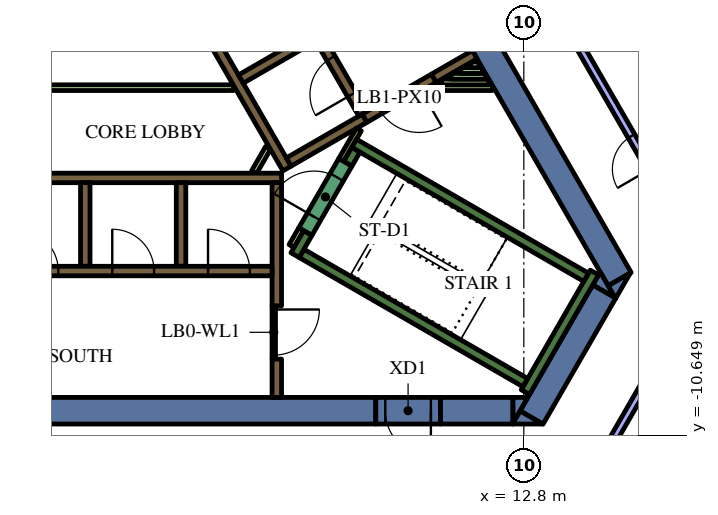
"""IFC4 building model, lengths in metres.
Left out: names, types, materials, properties, quantities, classifications, styles, units other than length and angle.
Written with IfcOpenShell. Run it as: python <this file> out.ifc"""

import sys

from ifc_helpers import new_model, si_unit, direction, frame, frame_2d, origin, place, context, subcontext, project, spatial, polyline, rectangle, outline, extrude, element, fill, save


model = new_model("IFC4")
c1 = context("Model", 3, precision=1e-05, world=origin(), true_north=direction((0.0, 1.0)))
c2 = subcontext(c1, "Body", "Model", "MODEL_VIEW")
j1 = project(units=[si_unit("LENGTHUNIT", "METRE"), si_unit("PLANEANGLEUNIT", "RADIAN")], contexts=[c1])
p1 = place(None, origin())
s1 = spatial("IfcSite", under=j1, at=p1, CompositionType="ELEMENT")
p2 = place(p1, origin())
s2 = spatial("IfcBuilding", under=s1, at=p2, CompositionType="ELEMENT")
p3 = place(p2, frame((0.0, 0.0, 243.6)))
s3 = spatial("IfcBuildingStorey", under=s2, at=p3, CompositionType="ELEMENT", Elevation=243.6)
p4 = place(p3, frame((9.085, 4.264, 0.0), z_axis=(0.0, 0.0, 1.0), x_axis=(0.499998082512, -0.866026510844, 0.0)))
e1 = element("IfcWall", 1, at=p4, inside=s3, PredefinedType="SOLIDWALL", context=c2, shape_type="SweptSolid", body=[
    extrude(rectangle(XDim=12.472, YDim=0.7, at=frame_2d((6.236, 0.0))), origin(), (0.0, 0.0, 1.0), 4.2),
])
p5 = place(p3, origin())
e2 = element("IfcWall", 2, at=p5, inside=s3, PredefinedType="SOLIDWALL", context=c2, shape_type="SweptSolid", body=[
    extrude(outline(polyline([(15.213, -7.05), (15.019, -6.714), (15.601, -6.378), (15.213, -7.05)])), origin(), (0.0, 0.0, 1.0), 4.2),
])
p6 = place(p3, frame((13.003, -10.179, 0.0), z_axis=(0.0, 0.0, 1.0), x_axis=(0.499972675833, 0.866041178825, 0.0)))
e3 = element("IfcWall", 3, at=p6, inside=s3, PredefinedType="SOLIDWALL", context=c2, shape_type="SweptSolid", body=[
    extrude(rectangle(XDim=3.829, YDim=0.7, at=frame_2d((1.915, 0.0))), origin(), (0.0, 0.0, 1.0), 4.2),
])
e4 = element("IfcWall", 4, at=p5, inside=s3, PredefinedType="SOLIDWALL", context=c2, shape_type="SweptSolid", body=[
    extrude(outline(polyline([(12.5, -10.35), (12.698, -10.005), (13.296, -10.35), (12.5, -10.35)])), origin(), (0.0, 0.0, 1.0), 4.2),
])
e5 = element("IfcWall", 5, at=p5, inside=s3, PredefinedType="SOLIDWALL", context=c2, shape_type="SweptSolid", body=[
    extrude(outline(polyline([(14.809, -6.35), (15.197, -7.022), (14.615, -6.686), (14.809, -6.35)])), origin(), (0.0, 0.0, 1.0), 4.2),
])
p7 = place(p3, frame((10.604, -10.0, 0.0), z_axis=(0.0, 0.0, 1.0), x_axis=(1.0, 0.0, 0.0)))
e6 = element("IfcWall", 6, at=p7, inside=s3, PredefinedType="SOLIDWALL", context=c2, shape_type="SweptSolid", body=[
    extrude(rectangle(XDim=1.909, YDim=0.7, at=frame_2d((0.955, 0.0))), origin(), (0.0, 0.0, 1.0), 4.2),
])
e7 = element("IfcWall", 7, at=p5, inside=s3, PredefinedType="SOLIDWALL", context=c2, shape_type="SweptSolid", body=[
    extrude(outline(polyline([(12.904, -9.65), (12.516, -10.322), (12.516, -9.65), (12.904, -9.65)])), origin(), (0.0, 0.0, 1.0), 4.2),
])
p8 = place(p3, frame((8.904, -10.0, 0.0), z_axis=(0.0, 0.0, 1.0), x_axis=(-1.0, 0.0, 0.0)))
e8 = element("IfcWall", 8, at=p8, inside=s3, PredefinedType="SOLIDWALL", context=c2, shape_type="SweptSolid", body=[
    extrude(rectangle(XDim=22.226, YDim=0.7, at=frame_2d((11.113, 0.0))), origin(), (0.0, 0.0, 1.0), 4.2),
])
p9 = place(p3, frame((12.84, -9.511, 0.0), z_axis=(0.0, 0.0, 1.0), x_axis=(0.500048121057, 0.865997619297, 0.0)))
e9 = element("IfcWall", 9, at=p9, inside=s3, PredefinedType="SOLIDWALL", context=c2, shape_type="SweptSolid", body=[
    extrude(rectangle(XDim=3.634, YDim=0.25, at=frame_2d((1.817, 0.0))), origin(), (0.0, 0.0, 1.0), 4.2),
])
p10 = place(p3, frame((12.84, -9.261, 0.0), z_axis=(0.0, 0.0, 1.0), x_axis=(-0.866013990052, 0.500019768644, 0.0)))
e10 = element("IfcWall", 10, at=p10, inside=s3, PredefinedType="SOLIDWALL", context=c2, shape_type="SweptSolid", body=[
    extrude(rectangle(XDim=6.8, YDim=0.25, at=frame_2d((3.4, 0.0))), origin(), (0.0, 0.0, 1.0), 4.2),
])
p11 = place(p3, frame((6.78, -5.906, 0.0), z_axis=(0.0, 0.0, 1.0), x_axis=(0.500223362819, 0.865896406789, 0.0)))
e11 = element("IfcWall", 11, at=p11, inside=s3, PredefinedType="SOLIDWALL", context=c2, shape_type="SweptSolid", body=[
    extrude(rectangle(XDim=0.675, YDim=0.25, at=frame_2d((0.337, 0.0))), origin(), (0.0, 0.0, 1.0), 4.2),
])
p12 = place(p3, frame((8.334, -2.964, 0.0), z_axis=(0.0, 0.0, 1.0), x_axis=(0.866016039709, -0.500016218704, 0.0)))
e12 = element("IfcWall", 12, at=p12, inside=s3, PredefinedType="SOLIDWALL", context=c2, shape_type="SweptSolid", body=[
    extrude(rectangle(XDim=7.05, YDim=0.25, at=frame_2d((3.525, 0.0))), origin(), (0.0, 0.0, 1.0), 4.2),
])
p13 = place(p3, frame((8.168, -3.503, 0.0), z_axis=(0.0, 0.0, 1.0), x_axis=(0.49972245349, 0.866185586049, 0.0)))
e13 = element("IfcWall", 13, at=p13, inside=s3, PredefinedType="SOLIDWALL", context=c2, shape_type="SweptSolid", body=[
    extrude(rectangle(XDim=0.425, YDim=0.25, at=frame_2d((0.212, 0.0))), origin(), (0.0, 0.0, 1.0), 4.2),
])
p14 = place(p3, frame((-5.545, -3.875, 0.0), z_axis=(0.0, 0.0, 1.0), x_axis=(1.0, 0.0, 0.0)))
e14 = element("IfcWall", 14, at=p14, inside=s3, PredefinedType="SOLIDWALL", context=c2, shape_type="SweptSolid", body=[
    extrude(rectangle(XDim=11.97, YDim=0.25, at=frame_2d((5.985, 0.0))), origin(), (0.0, 0.0, 1.0), 4.2),
])
p15 = place(p3, frame((6.3, -7.24, 0.0), z_axis=(0.0, 0.0, 1.0), x_axis=(0.0, 1.0, 0.0)))
e15 = element("IfcWall", 15, at=p15, inside=s3, PredefinedType="SOLIDWALL", context=c2, shape_type="SweptSolid", body=[
    extrude(rectangle(XDim=3.24, YDim=0.25, at=frame_2d((1.62, 0.0))), origin(), (0.0, 0.0, 1.0), 4.2),
])
p16 = place(p3, frame((6.3, -9.65, 0.0), z_axis=(0.0, 0.0, 1.0), x_axis=(0.0, 1.0, 0.0)))
e16 = element("IfcWall", 16, at=p16, inside=s3, PredefinedType="SOLIDWALL", context=c2, shape_type="SweptSolid", body=[
    extrude(rectangle(XDim=1.008, YDim=0.25, at=frame_2d((0.504, 0.0))), origin(), (0.0, 0.0, 1.0), 4.2),
])
for number, where, z_axis, x_axis in (
    (17, (3.78, -4.0, 0.0), (0.0, 0.0, 1.0), (0.0, -1.0, 0.0)),
    (18, (1.26, -4.0, 0.0), (0.0, 0.0, 1.0), (0.0, -1.0, 0.0)),
):
    element("IfcWall", number, at=place(p3, frame(where, z_axis=z_axis, x_axis=x_axis)), inside=s3, PredefinedType="SOLIDWALL", context=c2, shape_type="SweptSolid", body=[
        extrude(rectangle(XDim=2.2, YDim=0.25, at=frame_2d((1.1, 0.0))), origin(), (0.0, 0.0, 1.0), 4.2),
    ])
p17 = place(p3, frame((11.507, -0.631, 0.0), z_axis=(0.0, 0.0, 1.0), x_axis=(-0.866025525965, -0.499999788377, 0.0)))
e19 = element("IfcWall", 19, at=p17, inside=s3, PredefinedType="SOLIDWALL", context=c2, shape_type="SweptSolid", body=[
    extrude(rectangle(XDim=1.245, YDim=0.25, at=frame_2d((0.622, 0.0))), origin(), (0.0, 0.0, 1.0), 4.2),
])
p18 = place(p3, frame((6.568, -3.627, 0.0), z_axis=(0.0, 0.0, 1.0), x_axis=(-0.499999455981, 0.866025717874, 0.0)))
e20 = element("IfcWall", 20, at=p18, inside=s3, PredefinedType="SOLIDWALL", context=c2, shape_type="SweptSolid", body=[
    extrude(rectangle(XDim=11.978, YDim=0.25, at=frame_2d((5.989, 0.0))), origin(), (0.0, 0.0, 1.0), 4.2),
])
p19 = place(p3, frame((5.354, -1.274, 0.0), z_axis=(0.0, 0.0, 1.0), x_axis=(0.866008176907, 0.50002983664, 0.0)))
e21 = element("IfcWall", 21, at=p19, inside=s3, PredefinedType="SOLIDWALL", context=c2, shape_type="SweptSolid", body=[
    extrude(rectangle(XDim=2.2, YDim=0.25, at=frame_2d((1.1, 0.0))), origin(), (0.0, 0.0, 1.0), 4.2),
])
p20 = place(p3, frame((6.614, -3.456, 0.0), z_axis=(0.0, 0.0, 1.0), x_axis=(0.866025089694, 0.500000544019, 0.0)))
e22 = element("IfcWall", 22, at=p20, inside=s3, PredefinedType="SOLIDWALL", context=c2, shape_type="SweptSolid", body=[
    extrude(rectangle(XDim=2.305, YDim=0.25, at=frame_2d((1.153, 0.0))), origin(), (0.0, 0.0, 1.0), 4.2),
])
p21 = place(p3, frame((10.362, -1.5, 0.0), z_axis=(0.0, 0.0, 1.0), x_axis=(1.0, 0.0, 0.0)))
e23 = element("IfcWall", 23, at=p21, inside=s3, PredefinedType="PARTITIONING", context=c2, shape_type="SweptSolid", body=[
    extrude(rectangle(XDim=1.61, YDim=0.15, at=frame_2d((0.805, 0.0))), origin(), (0.0, 0.0, 1.0), 3.45),
])
p22 = place(p3, frame((10.622, -1.35, 0.0), z_axis=(0.0, 0.0, 1.0), x_axis=(1.0, 0.0, 0.0)))
e24 = element("IfcWall", 24, at=p22, inside=s3, PredefinedType="PARTITIONING", context=c2, shape_type="SweptSolid", body=[
    extrude(rectangle(XDim=1.263, YDim=0.15, at=frame_2d((0.632, 0.0))), origin(), (0.0, 0.0, 1.0), 3.45),
])
p23 = place(p3, frame((10.882, -1.2, 0.0), z_axis=(0.0, 0.0, 1.0), x_axis=(1.0, 0.0, 0.0)))
e25 = element("IfcWall", 25, at=p23, inside=s3, PredefinedType="PARTITIONING", context=c2, shape_type="SweptSolid", body=[
    extrude(rectangle(XDim=0.917, YDim=0.15, at=frame_2d((0.459, 0.0))), origin(), (0.0, 0.0, 1.0), 3.45),
])
p24 = place(p3, frame((11.712, -1.05, 0.0), z_axis=(0.0, 0.0, 1.0), x_axis=(-1.0, 0.0, 0.0)))
e26 = element("IfcWall", 26, at=p24, inside=s3, PredefinedType="PARTITIONING", context=c2, shape_type="SweptSolid", body=[
    extrude(rectangle(XDim=0.571, YDim=0.15, at=frame_2d((0.285, 0.0))), origin(), (0.0, 0.0, 1.0), 3.45),
])
p25 = place(p3, frame((11.401, -0.9, 0.0), z_axis=(0.0, 0.0, 1.0), x_axis=(1.0, 0.0, 0.0)))
e27 = element("IfcWall", 27, at=p25, inside=s3, PredefinedType="PARTITIONING", context=c2, shape_type="SweptSolid", body=[
    extrude(rectangle(XDim=0.224, YDim=0.15, at=frame_2d((0.112, 0.0))), origin(), (0.0, 0.0, 1.0), 3.45),
])
p26 = place(p3, frame((6.945, -5.222, 0.0), z_axis=(0.0, 0.0, 1.0), x_axis=(-0.499818422106, -0.866130212453, 0.0)))
e28 = element("IfcWall", 28, at=p26, inside=s3, PredefinedType="PARTITIONING", context=c2, shape_type="SweptSolid", body=[
    extrude(rectangle(XDim=0.514, YDim=0.15, at=frame_2d((0.257, 0.0))), origin(), (0.0, 0.0, 1.0), 3.45),
])
p27 = place(p3, frame((8.459, -2.599, 0.0), z_axis=(0.0, 0.0, 1.0), x_axis=(-0.500041054325, -0.866001699761, 0.0)))
e29 = element("IfcWall", 29, at=p27, inside=s3, PredefinedType="PARTITIONING", context=c2, shape_type="SweptSolid", body=[
    extrude(rectangle(XDim=0.929, YDim=0.15, at=frame_2d((0.464, 0.0))), origin(), (0.0, 0.0, 1.0), 4.2),
])
p28 = place(p3, frame((5.705, -3.718, 0.0), z_axis=(0.0, 0.0, 1.0), x_axis=(0.499962090823, 0.866047289552, 0.0)))
e30 = element("IfcWall", 30, at=p28, inside=s3, PredefinedType="PARTITIONING", context=c2, shape_type="SweptSolid", body=[
    extrude(rectangle(XDim=0.735, YDim=0.15, at=frame_2d((0.367, 0.0))), origin(), (0.0, 0.0, 1.0), 3.45),
])
p29 = place(p3, frame((-4.2, -1.5, 0.0), z_axis=(0.0, 0.0, 1.0), x_axis=(1.0, 0.0, 0.0)))
e31 = element("IfcWall", 31, at=p29, inside=s3, PredefinedType="PARTITIONING", context=c2, shape_type="SweptSolid", body=[
    extrude(rectangle(XDim=9.359, YDim=0.15, at=frame_2d((4.68, 0.0))), origin(), (0.0, 0.0, 1.0), 3.45),
])
p30 = place(p3, frame((-0.544, -1.393, 0.0), z_axis=(0.0, 0.0, 1.0), x_axis=(0.499928740635, 0.866066541489, 0.0)))
e32 = element("IfcWall", 32, at=p30, inside=s3, PredefinedType="PARTITIONING", context=c2, shape_type="SweptSolid", body=[
    extrude(rectangle(XDim=1.912, YDim=0.15, at=frame_2d((0.956, 0.0))), origin(), (0.0, 0.0, 1.0), 3.45),
])
p31 = place(p3, frame((-6.175, -6.325, 0.0), z_axis=(0.0, 0.0, 1.0), x_axis=(1.0, 0.0, 0.0)))
e33 = element("IfcWall", 33, at=p31, inside=s3, PredefinedType="SOLIDWALL", context=c2, shape_type="SweptSolid", body=[
    extrude(rectangle(XDim=12.35, YDim=0.25, at=frame_2d((6.175, 0.0))), origin(), (0.0, 0.0, 1.0), 4.2),
])
p32 = place(p31, frame((0.585, 0.0, 0.0)))
e34 = element("IfcOpeningElement", 34, at=p32, cuts=e33, PredefinedType="OPENING", context=c2, shape_type="SweptSolid", body=[
    extrude(rectangle(XDim=1.1, YDim=2.1, at=frame_2d((0.55, 1.05))), frame((0.0, 0.135, 0.0), z_axis=(0.0, -1.0, 0.0), x_axis=(1.0, 0.0, 0.0)), (0.0, 0.0, 1.0), 0.27),
])
p33 = place(p31, frame((3.105, 0.0, 0.0)))
e35 = element("IfcOpeningElement", 35, at=p33, cuts=e33, PredefinedType="OPENING", context=c2, shape_type="SweptSolid", body=[
    extrude(rectangle(XDim=1.1, YDim=2.1, at=frame_2d((0.55, 1.05))), frame((0.0, 0.135, 0.0), z_axis=(0.0, -1.0, 0.0), x_axis=(1.0, 0.0, 0.0)), (0.0, 0.0, 1.0), 0.27),
])
p34 = place(p31, frame((5.625, 0.0, 0.0)))
e36 = element("IfcOpeningElement", 36, at=p34, cuts=e33, PredefinedType="OPENING", context=c2, shape_type="SweptSolid", body=[
    extrude(rectangle(XDim=1.1, YDim=2.1, at=frame_2d((0.55, 1.05))), frame((0.0, 0.135, 0.0), z_axis=(0.0, -1.0, 0.0), x_axis=(1.0, 0.0, 0.0)), (0.0, 0.0, 1.0), 0.27),
])
p35 = place(p31, frame((8.145, 0.0, 0.0)))
e37 = element("IfcOpeningElement", 37, at=p35, cuts=e33, PredefinedType="OPENING", context=c2, shape_type="SweptSolid", body=[
    extrude(rectangle(XDim=1.1, YDim=2.1, at=frame_2d((0.55, 1.05))), frame((0.0, 0.135, 0.0), z_axis=(0.0, -1.0, 0.0), x_axis=(1.0, 0.0, 0.0)), (0.0, 0.0, 1.0), 0.27),
])
p36 = place(p31, frame((10.665, 0.0, 0.0)))
e38 = element("IfcOpeningElement", 38, at=p36, cuts=e33, PredefinedType="OPENING", context=c2, shape_type="SweptSolid", body=[
    extrude(rectangle(XDim=1.1, YDim=2.1, at=frame_2d((0.55, 1.05))), frame((0.0, 0.135, 0.0), z_axis=(0.0, -1.0, 0.0), x_axis=(1.0, 0.0, 0.0)), (0.0, 0.0, 1.0), 0.27),
])
p37 = place(p3, frame((8.565, -2.185, 0.0), z_axis=(0.0, 0.0, 1.0), x_axis=(-0.499997954832, 0.866026584559, 0.0)))
e39 = element("IfcWall", 39, at=p37, inside=s3, PredefinedType="SOLIDWALL", context=c2, shape_type="SweptSolid", body=[
    extrude(rectangle(XDim=12.35, YDim=0.25, at=frame_2d((6.175, 0.0))), origin(), (0.0, 0.0, 1.0), 4.2),
])
p38 = place(p37, frame((0.585, 0.0, 0.0)))
e40 = element("IfcOpeningElement", 40, at=p38, cuts=e39, PredefinedType="OPENING", context=c2, shape_type="SweptSolid", body=[
    extrude(rectangle(XDim=1.1, YDim=2.1, at=frame_2d((0.55, 1.05))), frame((0.0, 0.135, 0.0), z_axis=(0.0, -1.0, 0.0), x_axis=(1.0, 0.0, 0.0)), (0.0, 0.0, 1.0), 0.27),
])
p39 = place(p3, frame((7.053, -5.284, 0.0), z_axis=(0.0, 0.0, 1.0), x_axis=(0.500078061341, 0.865980330357, 0.0)))
e41 = element("IfcWall", 41, at=p39, inside=s3, PredefinedType="SOLIDWALL", context=c2, shape_type="SweptSolid", body=[
    extrude(rectangle(XDim=2.1, YDim=0.4, at=frame_2d((1.05, 0.0))), origin(), (0.0, 0.0, 1.0), 4.2),
])
p40 = place(p39, frame((0.45, 0.0, 0.0)))
e42 = element("IfcOpeningElement", 42, at=p40, cuts=e41, PredefinedType="OPENING", context=c2, shape_type="SweptSolid", body=[
    extrude(rectangle(XDim=1.2, YDim=2.1, at=frame_2d((0.6, 1.05))), frame((0.0, 0.21, 0.0), z_axis=(0.0, -1.0, 0.0), x_axis=(1.0, 0.0, 0.0)), (0.0, 0.0, 1.0), 0.42),
])
p41 = place(p3, frame((6.22, -7.237, 0.0), z_axis=(0.0, 0.0, 1.0), x_axis=(0.0, -1.0, 0.0)))
e43 = element("IfcWall", 43, at=p41, inside=s3, PredefinedType="PARTITIONING", context=c2, shape_type="SweptSolid", body=[
    extrude(rectangle(XDim=1.4, YDim=0.09, at=frame_2d((0.7, 0.0))), origin(), (0.0, 0.0, 1.0), 3.45),
])
p42 = place(p41, frame((0.1, 0.0, 0.0)))
e44 = element("IfcOpeningElement", 44, at=p42, cuts=e43, PredefinedType="OPENING", context=c2, shape_type="SweptSolid", body=[
    extrude(rectangle(XDim=1.2, YDim=2.1, at=frame_2d((0.6, 1.05))), frame((0.0, 0.055, 0.0), z_axis=(0.0, -1.0, 0.0), x_axis=(1.0, 0.0, 0.0)), (0.0, 0.0, 1.0), 0.11),
])
p43 = place(p3, frame((10.429, -1.253, 0.0), z_axis=(0.0, 0.0, 1.0), x_axis=(-0.866009402589, -0.500027713859, 0.0)))
e45 = element("IfcWall", 45, at=p43, inside=s3, PredefinedType="SOLIDWALL", context=c2, shape_type="SweptSolid", body=[
    extrude(rectangle(XDim=2.1, YDim=0.25, at=frame_2d((1.05, 0.0))), origin(), (0.0, 0.0, 1.0), 4.2),
])
p44 = place(p43, frame((0.45, 0.0, 0.0)))
e46 = element("IfcOpeningElement", 46, at=p44, cuts=e45, PredefinedType="OPENING", context=c2, shape_type="SweptSolid", body=[
    extrude(rectangle(XDim=1.2, YDim=2.1, at=frame_2d((0.6, 1.05))), frame((0.0, 0.135, 0.0), z_axis=(0.0, -1.0, 0.0), x_axis=(1.0, 0.0, 0.0)), (0.0, 0.0, 1.0), 0.27),
])
p45 = place(p3, frame((10.604, -10.0, 0.0), z_axis=(0.0, 0.0, 1.0), x_axis=(-1.0, 0.0, 0.0)))
e47 = element("IfcWall", 47, at=p45, inside=s3, PredefinedType="SOLIDWALL", context=c2, shape_type="SweptSolid", body=[
    extrude(rectangle(XDim=1.7, YDim=0.7, at=frame_2d((0.85, 0.0))), origin(), (0.0, 0.0, 1.0), 4.2),
])
p46 = place(p45, frame((0.25, 0.0, 0.0)))
e48 = element("IfcOpeningElement", 48, at=p46, cuts=e47, PredefinedType="OPENING", context=c2, shape_type="SweptSolid", body=[
    extrude(rectangle(XDim=1.2, YDim=2.1, at=frame_2d((0.6, 1.05))), frame((0.0, 0.36, 0.0), z_axis=(0.0, -1.0, 0.0), x_axis=(1.0, 0.0, 0.0)), (0.0, 0.0, 1.0), 0.72),
])
p47 = place(p3, frame((14.498, -11.888, 0.0), z_axis=(0.0, 0.0, 1.0), x_axis=(0.500006981563, 0.86602137294, 0.0)))
e49 = element("IfcWall", 49, at=p47, inside=s3, PredefinedType="PARTITIONING", context=c2, shape_type="SweptSolid", body=[
    extrude(rectangle(XDim=2.946, YDim=0.2, at=frame_2d((1.473, 0.0))), origin(), (0.0, 0.0, 1.0), 3.45),
])
p48 = place(p3, frame((17.681, -6.324, 0.0), z_axis=(0.0, 0.0, 1.0), x_axis=(-0.50002695829, 0.866009838849, 0.0)))
e50 = element("IfcWall", 50, at=p48, inside=s3, PredefinedType="PARTITIONING", context=c2, shape_type="SweptSolid", body=[
    extrude(rectangle(XDim=7.287, YDim=0.2, at=frame_2d((3.644, 0.0))), origin(), (0.0, 0.0, 1.0), 3.45),
])
p49 = place(p48, frame((3.1, 0.0, 0.0)))
e51 = element("IfcOpeningElement", 51, at=p49, cuts=e50, PredefinedType="OPENING", context=c2, shape_type="SweptSolid", body=[
    extrude(rectangle(XDim=1.0, YDim=2.1, at=frame_2d((0.5, 1.05))), frame((0.0, 0.11, 0.0), z_axis=(0.0, -1.0, 0.0), x_axis=(1.0, 0.0, 0.0)), (0.0, 0.0, 1.0), 0.22),
])
p50 = place(p34, origin())
e52 = element("IfcDoor", 52, at=p50, inside=s3, OperationType="DOUBLE_DOOR_SLIDING", PredefinedType="DOOR", context=c2, shape_type="SweptSolid", body=[
    extrude(rectangle(XDim=1.1, YDim=2.1, at=frame_2d((0.55, 1.05))), frame((0.0, 0.025, 0.0), z_axis=(0.0, -1.0, 0.0), x_axis=(1.0, 0.0, 0.0)), (0.0, 0.0, 1.0), 0.05),
])
fill(e36, e52)
p51 = place(p35, origin())
e53 = element("IfcDoor", 53, at=p51, inside=s3, OperationType="DOUBLE_DOOR_SLIDING", PredefinedType="DOOR", context=c2, shape_type="SweptSolid", body=[
    extrude(rectangle(XDim=1.1, YDim=2.1, at=frame_2d((0.55, 1.05))), frame((0.0, 0.025, 0.0), z_axis=(0.0, -1.0, 0.0), x_axis=(1.0, 0.0, 0.0)), (0.0, 0.0, 1.0), 0.05),
])
fill(e37, e53)
p52 = place(p36, origin())
e54 = element("IfcDoor", 54, at=p52, inside=s3, OperationType="DOUBLE_DOOR_SLIDING", PredefinedType="DOOR", context=c2, shape_type="SweptSolid", body=[
    extrude(rectangle(XDim=1.1, YDim=2.1, at=frame_2d((0.55, 1.05))), frame((0.0, 0.025, 0.0), z_axis=(0.0, -1.0, 0.0), x_axis=(1.0, 0.0, 0.0)), (0.0, 0.0, 1.0), 0.05),
])
fill(e38, e54)
p53 = place(p38, origin())
e55 = element("IfcDoor", 55, at=p53, inside=s3, OperationType="DOUBLE_DOOR_SLIDING", PredefinedType="DOOR", context=c2, shape_type="SweptSolid", body=[
    extrude(rectangle(XDim=1.1, YDim=2.1, at=frame_2d((0.55, 1.05))), frame((0.0, 0.025, 0.0), z_axis=(0.0, -1.0, 0.0), x_axis=(1.0, 0.0, 0.0)), (0.0, 0.0, 1.0), 0.05),
])
fill(e40, e55)
p54 = place(p40, origin())
e56 = element("IfcDoor", 56, at=p54, inside=s3, OperationType="SINGLE_SWING_LEFT", PredefinedType="DOOR", context=c2, shape_type="SweptSolid", body=[
    extrude(rectangle(XDim=1.2, YDim=2.1, at=frame_2d((0.6, 1.05))), frame((0.0, 0.025, 0.0), z_axis=(0.0, -1.0, 0.0), x_axis=(1.0, 0.0, 0.0)), (0.0, 0.0, 1.0), 0.05),
])
fill(e42, e56)
p55 = place(p42, origin())
e57 = element("IfcDoor", 57, at=p55, inside=s3, OperationType="SINGLE_SWING_LEFT", PredefinedType="DOOR", context=c2, shape_type="SweptSolid", body=[
    extrude(rectangle(XDim=1.2, YDim=2.1, at=frame_2d((0.6, 1.05))), frame((0.0, 0.025, 0.0), z_axis=(0.0, -1.0, 0.0), x_axis=(1.0, 0.0, 0.0)), (0.0, 0.0, 1.0), 0.05),
])
fill(e44, e57)
p56 = place(p44, origin())
e58 = element("IfcDoor", 58, at=p56, inside=s3, OperationType="SINGLE_SWING_LEFT", PredefinedType="DOOR", context=c2, shape_type="SweptSolid", body=[
    extrude(rectangle(XDim=1.2, YDim=2.1, at=frame_2d((0.6, 1.05))), frame((0.0, 0.025, 0.0), z_axis=(0.0, -1.0, 0.0), x_axis=(1.0, 0.0, 0.0)), (0.0, 0.0, 1.0), 0.05),
])
fill(e46, e58)
p57 = place(p46, origin())
e59 = element("IfcDoor", 59, at=p57, inside=s3, OperationType="SINGLE_SWING_LEFT", PredefinedType="DOOR", context=c2, shape_type="SweptSolid", body=[
    extrude(rectangle(XDim=1.2, YDim=2.1, at=frame_2d((0.6, 1.05))), frame((0.0, 0.025, 0.0), z_axis=(0.0, -1.0, 0.0), x_axis=(1.0, 0.0, 0.0)), (0.0, 0.0, 1.0), 0.05),
])
fill(e48, e59)
p58 = place(p49, origin())
e60 = element("IfcDoor", 60, at=p58, inside=s3, OperationType="SINGLE_SWING_LEFT", PredefinedType="DOOR", context=c2, shape_type="SweptSolid", body=[
    extrude(rectangle(XDim=1.0, YDim=2.1, at=frame_2d((0.5, 1.05))), frame((0.0, 0.025, 0.0), z_axis=(0.0, -1.0, 0.0), x_axis=(1.0, 0.0, 0.0)), (0.0, 0.0, 1.0), 0.05),
])
fill(e51, e60)
save(model, sys.argv[1])
